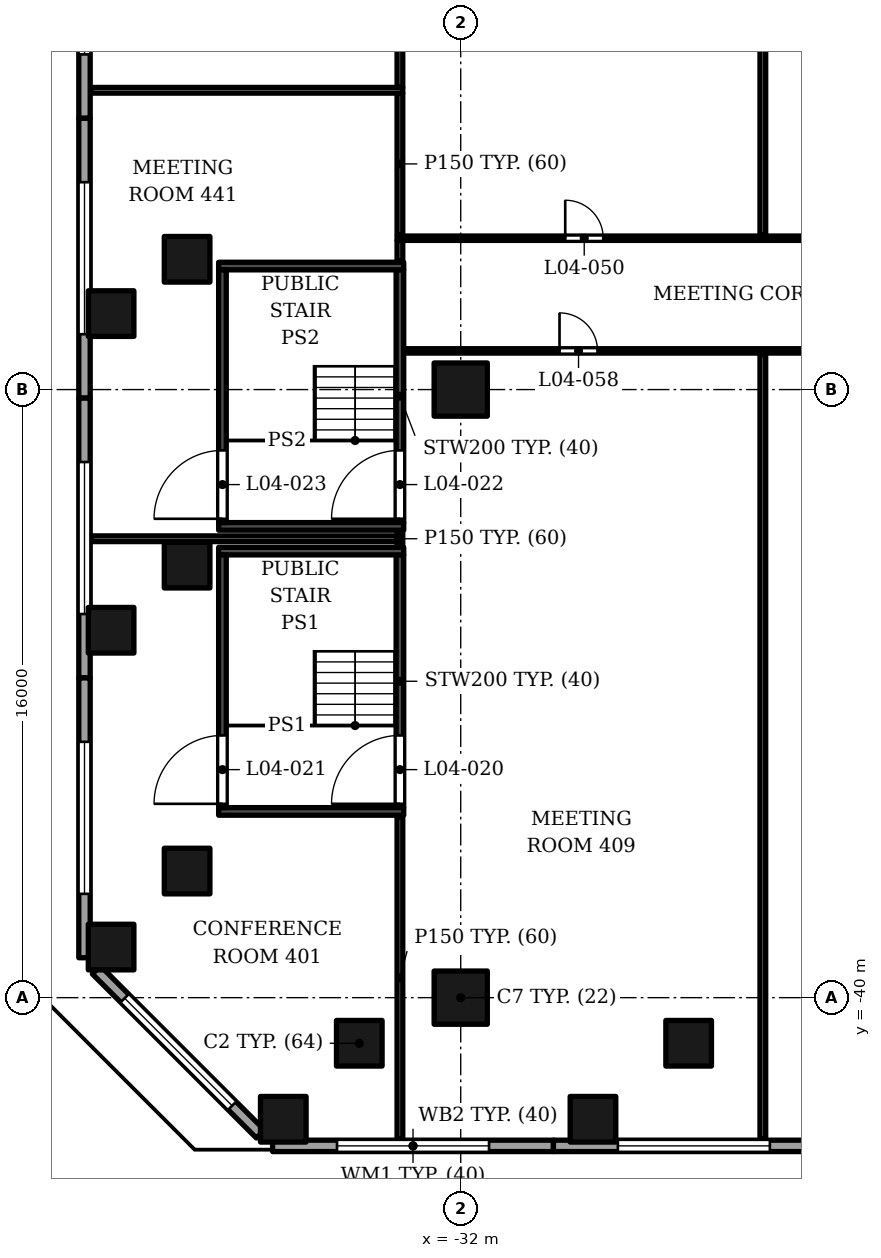
"""IFC4 building model, lengths in metres.
Left out: names, types, materials, properties, quantities, classifications, styles, units other than length and angle.
Written with IfcOpenShell. Run it as: python <this file> out.ifc"""

import sys

from ifc_helpers import new_model, si_unit, direction, frame, frame_2d, origin, origin_2d, place, context, subcontext, project, spatial, rectangle, extrude, element, fill, save


model = new_model("IFC4")
c1 = context("Model", 3, precision=1e-05, world=origin(), true_north=direction((0.0, 1.0)))
c2 = subcontext(c1, "Body", "Model", "MODEL_VIEW")
j1 = project(units=[si_unit("LENGTHUNIT", "METRE"), si_unit("PLANEANGLEUNIT", "RADIAN")], contexts=[c1])
p1 = place(None, origin())
s1 = spatial("IfcSite", under=j1, at=p1, CompositionType="ELEMENT")
p2 = place(p1, origin())
s2 = spatial("IfcBuilding", under=s1, at=p2, CompositionType="ELEMENT")
p3 = place(p2, frame((0.0, 0.0, 34.5)))
s3 = spatial("IfcBuildingStorey", under=s2, at=p3, CompositionType="ELEMENT", Elevation=34.5)
for number, where, z_axis, x_axis in (
    (1, (-32.0, -40.0, 0.0), (0.0, 0.0, 1.0), (1.0, 0.0, 0.0)),
    (2, (-32.0, -24.0, 0.0), (0.0, 0.0, 1.0), (1.0, 0.0, 0.0)),
):
    element("IfcColumn", number, at=place(p3, frame(where, z_axis=z_axis, x_axis=x_axis)), inside=s3, PredefinedType="COLUMN", context=c2, shape_type="SweptSolid", body=[
        extrude(rectangle(XDim=1.4, YDim=1.4, at=origin_2d()), origin(), (0.0, 0.0, 1.0), 5.5),
    ])
for number, where, z_axis, x_axis in (
    (3, (-34.669, -41.2, 0.0), (0.0, 0.0, 1.0), (1.0, 0.0, 0.0)),
    (4, (-39.2, -36.669, 0.0), (0.0, 0.0, 1.0), (1.0, 0.0, 0.0)),
    (5, (-39.2, -28.62, 0.0), (0.0, 0.0, 1.0), (1.0, 0.0, 0.0)),
    (6, (-39.2, -20.572, 0.0), (0.0, 0.0, 1.0), (1.0, 0.0, 0.0)),
    (7, (-26.002, -41.2, 0.0), (0.0, 0.0, 1.0), (1.0, 0.0, 0.0)),
    (8, (-36.669, -43.2, 0.0), (0.0, 0.0, 1.0), (1.0, 0.0, 0.0)),
    (9, (-41.2, -38.669, 0.0), (0.0, 0.0, 1.0), (1.0, 0.0, 0.0)),
    (10, (-41.2, -30.333, 0.0), (0.0, 0.0, 1.0), (1.0, 0.0, 0.0)),
    (11, (-41.2, -22.001, 0.0), (0.0, 0.0, 1.0), (1.0, 0.0, 0.0)),
    (12, (-28.52, -43.2, 0.0), (0.0, 0.0, 1.0), (1.0, 0.0, 0.0)),
):
    element("IfcColumn", number, at=place(p3, frame(where, z_axis=z_axis, x_axis=x_axis)), inside=s3, PredefinedType="COLUMN", context=c2, shape_type="SweptSolid", body=[
        extrude(rectangle(XDim=1.2, YDim=1.2, at=origin_2d()), origin(), (0.0, 0.0, 1.0), 5.5),
    ])
p4 = place(p3, frame((-36.95, -43.9, 0.0), z_axis=(0.0, 0.0, 1.0), x_axis=(1.0, 0.0, 0.0)))
e13 = element("IfcWall", 13, at=p4, inside=s3, PredefinedType="SOLIDWALL", context=c2, shape_type="SweptSolid", body=[
    extrude(rectangle(XDim=7.39, YDim=0.3, at=frame_2d((3.695, 0.0))), origin(), (0.0, 0.0, 1.0), 4.1),
])
p5 = place(p4, frame((1.695, 0.0, 1.0)))
e14 = element("IfcOpeningElement", 14, at=p5, cuts=e13, PredefinedType="OPENING", context=c2, shape_type="SweptSolid", body=[
    extrude(rectangle(XDim=4.0, YDim=1.8, at=frame_2d((2.0, 0.9))), frame((0.0, 0.16, 0.0), z_axis=(0.0, -1.0, 0.0), x_axis=(1.0, 0.0, 0.0)), (0.0, 0.0, 1.0), 0.32),
])
p6 = place(p3, frame((-29.56, -43.9, 0.0), z_axis=(0.0, 0.0, 1.0), x_axis=(1.0, 0.0, 0.0)))
e15 = element("IfcWall", 15, at=p6, inside=s3, PredefinedType="SOLIDWALL", context=c2, shape_type="SweptSolid", body=[
    extrude(rectangle(XDim=7.39, YDim=0.3, at=frame_2d((3.695, 0.0))), origin(), (0.0, 0.0, 1.0), 4.1),
])
p7 = place(p6, frame((1.695, 0.0, 1.0)))
e16 = element("IfcOpeningElement", 16, at=p7, cuts=e15, PredefinedType="OPENING", context=c2, shape_type="SweptSolid", body=[
    extrude(rectangle(XDim=4.0, YDim=1.8, at=frame_2d((2.0, 0.9))), frame((0.0, 0.16, 0.0), z_axis=(0.0, -1.0, 0.0), x_axis=(1.0, 0.0, 0.0)), (0.0, 0.0, 1.0), 0.32),
])
p8 = place(p3, frame((-41.9, -9.5, 0.0), z_axis=(0.0, 0.0, 1.0), x_axis=(0.0, -1.0, 0.0)))
e17 = element("IfcWall", 17, at=p8, inside=s3, PredefinedType="SOLIDWALL", context=c2, shape_type="SweptSolid", body=[
    extrude(rectangle(XDim=7.363, YDim=0.3, at=frame_2d((3.681, 0.0))), origin(), (0.0, 0.0, 1.0), 4.1),
])
p9 = place(p8, frame((1.681, 0.0, 1.0)))
e18 = element("IfcOpeningElement", 18, at=p9, cuts=e17, PredefinedType="OPENING", context=c2, shape_type="SweptSolid", body=[
    extrude(rectangle(XDim=4.0, YDim=1.8, at=frame_2d((2.0, 0.9))), frame((0.0, 0.16, 0.0), z_axis=(0.0, -1.0, 0.0), x_axis=(1.0, 0.0, 0.0)), (0.0, 0.0, 1.0), 0.32),
])
p10 = place(p3, frame((-41.9, -16.863, 0.0), z_axis=(0.0, 0.0, 1.0), x_axis=(0.0, -1.0, 0.0)))
e19 = element("IfcWall", 19, at=p10, inside=s3, PredefinedType="SOLIDWALL", context=c2, shape_type="SweptSolid", body=[
    extrude(rectangle(XDim=7.363, YDim=0.3, at=frame_2d((3.681, 0.0))), origin(), (0.0, 0.0, 1.0), 4.1),
])
p11 = place(p10, frame((1.681, 0.0, 1.0)))
e20 = element("IfcOpeningElement", 20, at=p11, cuts=e19, PredefinedType="OPENING", context=c2, shape_type="SweptSolid", body=[
    extrude(rectangle(XDim=4.0, YDim=1.8, at=frame_2d((2.0, 0.9))), frame((0.0, 0.16, 0.0), z_axis=(0.0, -1.0, 0.0), x_axis=(1.0, 0.0, 0.0)), (0.0, 0.0, 1.0), 0.32),
])
p12 = place(p3, frame((-41.9, -24.225, 0.0), z_axis=(0.0, 0.0, 1.0), x_axis=(0.0, -1.0, 0.0)))
e21 = element("IfcWall", 21, at=p12, inside=s3, PredefinedType="SOLIDWALL", context=c2, shape_type="SweptSolid", body=[
    extrude(rectangle(XDim=7.362, YDim=0.3, at=frame_2d((3.681, 0.0))), origin(), (0.0, 0.0, 1.0), 4.1),
])
p13 = place(p12, frame((1.681, 0.0, 1.0)))
e22 = element("IfcOpeningElement", 22, at=p13, cuts=e21, PredefinedType="OPENING", context=c2, shape_type="SweptSolid", body=[
    extrude(rectangle(XDim=4.0, YDim=1.8, at=frame_2d((2.0, 0.9))), frame((0.0, 0.16, 0.0), z_axis=(0.0, -1.0, 0.0), x_axis=(1.0, 0.0, 0.0)), (0.0, 0.0, 1.0), 0.32),
])
p14 = place(p3, frame((-41.9, -31.587, 0.0), z_axis=(0.0, 0.0, 1.0), x_axis=(0.0, -1.0, 0.0)))
e23 = element("IfcWall", 23, at=p14, inside=s3, PredefinedType="SOLIDWALL", context=c2, shape_type="SweptSolid", body=[
    extrude(rectangle(XDim=7.363, YDim=0.3, at=frame_2d((3.681, 0.0))), origin(), (0.0, 0.0, 1.0), 4.1),
])
p15 = place(p14, frame((1.681, 0.0, 1.0)))
e24 = element("IfcOpeningElement", 24, at=p15, cuts=e23, PredefinedType="OPENING", context=c2, shape_type="SweptSolid", body=[
    extrude(rectangle(XDim=4.0, YDim=1.8, at=frame_2d((2.0, 0.9))), frame((0.0, 0.16, 0.0), z_axis=(0.0, -1.0, 0.0), x_axis=(1.0, 0.0, 0.0)), (0.0, 0.0, 1.0), 0.32),
])
p16 = place(p3, frame((-41.588, -39.271, 0.0), z_axis=(0.0, 0.0, 1.0), x_axis=(0.707106781187, -0.707106781187, 0.0)))
e25 = element("IfcWall", 25, at=p16, inside=s3, PredefinedType="SOLIDWALL", context=c2, shape_type="SweptSolid", body=[
    extrude(rectangle(XDim=6.105, YDim=0.3, at=frame_2d((3.052, 0.0))), origin(), (0.0, 0.0, 1.0), 3.85),
])
p17 = place(p16, frame((1.052, 0.0, 1.0)))
e26 = element("IfcOpeningElement", 26, at=p17, cuts=e25, PredefinedType="OPENING", context=c2, shape_type="SweptSolid", body=[
    extrude(rectangle(XDim=4.0, YDim=1.8, at=frame_2d((2.0, 0.9))), frame((0.0, 0.16, 0.0), z_axis=(0.0, -1.0, 0.0), x_axis=(1.0, 0.0, 0.0)), (0.0, 0.0, 1.0), 0.32),
])
p18 = place(p3, frame((-37.0, -43.85, 5.5), z_axis=(0.0, 0.0, 1.0), x_axis=(1.0, 0.0, 0.0)))
e27 = element("IfcWall", 27, at=p18, inside=s3, PredefinedType="PARAPET", context=c2, shape_type="SweptSolid", body=[
    extrude(rectangle(XDim=14.8, YDim=0.3, at=frame_2d((7.4, 0.0))), origin(), (0.0, 0.0, 1.0), 1.1),
])
for number, where, z_axis, x_axis in (
    (28, (-41.85, -9.605, 5.5), (0.0, 0.0, 1.0), (0.0, -1.0, 0.0)),
    (29, (-41.85, -24.302, 5.5), (0.0, 0.0, 1.0), (0.0, -1.0, 0.0)),
):
    element("IfcWall", number, at=place(p3, frame(where, z_axis=z_axis, x_axis=x_axis)), inside=s3, PredefinedType="PARAPET", context=c2, shape_type="SweptSolid", body=[
        extrude(rectangle(XDim=14.698, YDim=0.3, at=frame_2d((7.349, 0.0))), origin(), (0.0, 0.0, 1.0), 1.1),
    ])
p19 = place(p3, frame((-41.745, -39.042, 5.5), z_axis=(0.0, 0.0, 1.0), x_axis=(0.70708898898, -0.707124572946, 0.0)))
e30 = element("IfcWall", 30, at=p19, inside=s3, PredefinedType="PARAPET", context=c2, shape_type="SweptSolid", body=[
    extrude(rectangle(XDim=6.861, YDim=0.3, at=frame_2d((3.431, 0.0))), origin(), (0.0, 0.0, 1.0), 1.1),
])
for number, where, z_axis, x_axis in (
    (31, (-38.37, -35.1, 0.0), (0.0, 0.0, 1.0), (1.0, 0.0, 0.0)),
    (32, (-38.37, -28.25, 0.0), (0.0, 0.0, 1.0), (1.0, 0.0, 0.0)),
):
    element("IfcWall", number, at=place(p3, frame(where, z_axis=z_axis, x_axis=x_axis)), inside=s3, PredefinedType="SOLIDWALL", context=c2, shape_type="SweptSolid", body=[
        extrude(rectangle(XDim=4.87, YDim=0.2, at=frame_2d((2.435, 0.0))), origin(), (0.0, 0.0, 1.0), 5.05),
    ])
p20 = place(p3, frame((-38.27, -35.0, 0.0), z_axis=(0.0, 0.0, 1.0), x_axis=(0.0, 1.0, 0.0)))
e33 = element("IfcWall", 33, at=p20, inside=s3, PredefinedType="SOLIDWALL", context=c2, shape_type="SweptSolid", body=[
    extrude(rectangle(XDim=6.65, YDim=0.2, at=frame_2d((3.325, 0.0))), origin(), (0.0, 0.0, 1.0), 5.05),
])
p21 = place(p20, frame((0.1, 0.0, 0.0)))
e34 = element("IfcOpeningElement", 34, at=p21, cuts=e33, PredefinedType="OPENING", context=c2, shape_type="SweptSolid", body=[
    extrude(rectangle(XDim=1.8, YDim=2.4, at=frame_2d((0.9, 1.2))), frame((0.0, 0.11, 0.0), z_axis=(0.0, -1.0, 0.0), x_axis=(1.0, 0.0, 0.0)), (0.0, 0.0, 1.0), 0.22),
])
p22 = place(p3, frame((-33.6, -35.0, 0.0), z_axis=(0.0, 0.0, 1.0), x_axis=(0.0, 1.0, 0.0)))
e35 = element("IfcWall", 35, at=p22, inside=s3, PredefinedType="SOLIDWALL", context=c2, shape_type="SweptSolid", body=[
    extrude(rectangle(XDim=6.65, YDim=0.2, at=frame_2d((3.325, 0.0))), origin(), (0.0, 0.0, 1.0), 5.05),
])
p23 = place(p22, frame((0.1, 0.0, 0.0)))
e36 = element("IfcOpeningElement", 36, at=p23, cuts=e35, PredefinedType="OPENING", context=c2, shape_type="SweptSolid", body=[
    extrude(rectangle(XDim=1.8, YDim=2.4, at=frame_2d((0.9, 1.2))), frame((0.0, 0.11, 0.0), z_axis=(0.0, -1.0, 0.0), x_axis=(1.0, 0.0, 0.0)), (0.0, 0.0, 1.0), 0.22),
])
for number, where, z_axis, x_axis in (
    (37, (-38.37, -27.6, 0.0), (0.0, 0.0, 1.0), (1.0, 0.0, 0.0)),
    (38, (-38.37, -20.75, 0.0), (0.0, 0.0, 1.0), (1.0, 0.0, 0.0)),
):
    element("IfcWall", number, at=place(p3, frame(where, z_axis=z_axis, x_axis=x_axis)), inside=s3, PredefinedType="SOLIDWALL", context=c2, shape_type="SweptSolid", body=[
        extrude(rectangle(XDim=4.87, YDim=0.2, at=frame_2d((2.435, 0.0))), origin(), (0.0, 0.0, 1.0), 5.05),
    ])
p24 = place(p3, frame((-38.27, -27.5, 0.0), z_axis=(0.0, 0.0, 1.0), x_axis=(0.0, 1.0, 0.0)))
e39 = element("IfcWall", 39, at=p24, inside=s3, PredefinedType="SOLIDWALL", context=c2, shape_type="SweptSolid", body=[
    extrude(rectangle(XDim=6.65, YDim=0.2, at=frame_2d((3.325, 0.0))), origin(), (0.0, 0.0, 1.0), 5.05),
])
p25 = place(p24, frame((0.1, 0.0, 0.0)))
e40 = element("IfcOpeningElement", 40, at=p25, cuts=e39, PredefinedType="OPENING", context=c2, shape_type="SweptSolid", body=[
    extrude(rectangle(XDim=1.8, YDim=2.4, at=frame_2d((0.9, 1.2))), frame((0.0, 0.11, 0.0), z_axis=(0.0, -1.0, 0.0), x_axis=(1.0, 0.0, 0.0)), (0.0, 0.0, 1.0), 0.22),
])
p26 = place(p3, frame((-33.6, -27.5, 0.0), z_axis=(0.0, 0.0, 1.0), x_axis=(0.0, 1.0, 0.0)))
e41 = element("IfcWall", 41, at=p26, inside=s3, PredefinedType="SOLIDWALL", context=c2, shape_type="SweptSolid", body=[
    extrude(rectangle(XDim=6.65, YDim=0.2, at=frame_2d((3.325, 0.0))), origin(), (0.0, 0.0, 1.0), 5.05),
])
p27 = place(p26, frame((0.1, 0.0, 0.0)))
e42 = element("IfcOpeningElement", 42, at=p27, cuts=e41, PredefinedType="OPENING", context=c2, shape_type="SweptSolid", body=[
    extrude(rectangle(XDim=1.8, YDim=2.4, at=frame_2d((0.9, 1.2))), frame((0.0, 0.11, 0.0), z_axis=(0.0, -1.0, 0.0), x_axis=(1.0, 0.0, 0.0)), (0.0, 0.0, 1.0), 0.22),
])
p28 = place(p3, frame((-33.6, -43.72, 0.0), z_axis=(0.0, 0.0, 1.0), x_axis=(0.0, 1.0, 0.0)))
e43 = element("IfcWall", 43, at=p28, inside=s3, PredefinedType="PARTITIONING", context=c2, shape_type="SweptSolid", body=[
    extrude(rectangle(XDim=8.48, YDim=0.15, at=frame_2d((4.24, 0.0))), origin(), (0.0, 0.0, 1.0), 3.85),
])
p29 = place(p3, frame((-24.05, -43.72, 0.0), z_axis=(0.0, 0.0, 1.0), x_axis=(0.0, 1.0, 0.0)))
e44 = element("IfcWall", 44, at=p29, inside=s3, PredefinedType="PARTITIONING", context=c2, shape_type="SweptSolid", body=[
    extrude(rectangle(XDim=20.645, YDim=0.15, at=frame_2d((10.323, 0.0))), origin(), (0.0, 0.0, 1.0), 3.85),
])
p30 = place(p3, frame((-33.6, -28.11, 0.0), z_axis=(0.0, 0.0, 1.0), x_axis=(0.0, 1.0, 0.0)))
e45 = element("IfcWall", 45, at=p30, inside=s3, PredefinedType="PARTITIONING", context=c2, shape_type="SweptSolid", body=[
    extrude(rectangle(XDim=0.37, YDim=0.15, at=frame_2d((0.185, 0.0))), origin(), (0.0, 0.0, 1.0), 5.05),
])
p31 = place(p3, frame((-41.72, -27.925, 0.0), z_axis=(0.0, 0.0, 1.0), x_axis=(1.0, 0.0, 0.0)))
e46 = element("IfcWall", 46, at=p31, inside=s3, PredefinedType="PARTITIONING", context=c2, shape_type="SweptSolid", body=[
    extrude(rectangle(XDim=8.045, YDim=0.15, at=frame_2d((4.022, 0.0))), origin(), (0.0, 0.0, 1.0), 4.15),
])
p32 = place(p3, frame((-33.46, -22.982, 0.0), z_axis=(0.0, 0.0, 1.0), x_axis=(1.0, 0.0, 0.0)))
e47 = element("IfcWall", 47, at=p32, inside=s3, PredefinedType="PARTITIONING", context=c2, shape_type="SweptSolid", body=[
    extrude(rectangle(XDim=18.69, YDim=0.115, at=frame_2d((9.345, 0.0))), origin(), (0.0, 0.0, 1.0), 3.85),
])
p33 = place(p32, frame((4.06, 0.0, 0.0)))
e48 = element("IfcOpeningElement", 48, at=p33, cuts=e47, PredefinedType="OPENING", context=c2, shape_type="SweptSolid", body=[
    extrude(rectangle(XDim=1.0, YDim=2.1, at=frame_2d((0.5, 1.05))), frame((0.0, 0.067, 0.0), z_axis=(0.0, -1.0, 0.0), x_axis=(1.0, 0.0, 0.0)), (0.0, 0.0, 1.0), 0.135),
])
p34 = place(p3, frame((-33.6, -20.61, 0.0), z_axis=(0.0, 0.0, 1.0), x_axis=(0.0, 1.0, 0.0)))
e49 = element("IfcWall", 49, at=p34, inside=s3, PredefinedType="PARTITIONING", context=c2, shape_type="SweptSolid", body=[
    extrude(rectangle(XDim=0.535, YDim=0.15, at=frame_2d((0.268, 0.0))), origin(), (0.0, 0.0, 1.0), 5.05),
])
p35 = place(p3, frame((-33.675, -20.018, 0.0), z_axis=(0.0, 0.0, 1.0), x_axis=(1.0, 0.0, 0.0)))
e50 = element("IfcWall", 50, at=p35, inside=s3, PredefinedType="PARTITIONING", context=c2, shape_type="SweptSolid", body=[
    extrude(rectangle(XDim=18.905, YDim=0.115, at=frame_2d((9.453, 0.0))), origin(), (0.0, 0.0, 1.0), 3.85),
])
p36 = place(p35, frame((4.425, 0.0, 0.0)))
e51 = element("IfcOpeningElement", 51, at=p36, cuts=e50, PredefinedType="OPENING", context=c2, shape_type="SweptSolid", body=[
    extrude(rectangle(XDim=1.0, YDim=2.1, at=frame_2d((0.5, 1.05))), frame((0.0, 0.067, 0.0), z_axis=(0.0, -1.0, 0.0), x_axis=(1.0, 0.0, 0.0)), (0.0, 0.0, 1.0), 0.135),
])
p37 = place(p3, frame((-33.6, -19.925, 0.0), z_axis=(0.0, 0.0, 1.0), x_axis=(0.0, 1.0, 0.0)))
e52 = element("IfcWall", 52, at=p37, inside=s3, PredefinedType="PARTITIONING", context=c2, shape_type="SweptSolid", body=[
    extrude(rectangle(XDim=3.725, YDim=0.15, at=frame_2d((1.863, 0.0))), origin(), (0.0, 0.0, 1.0), 5.05),
])
p38 = place(p3, frame((-24.05, -19.925, 0.0), z_axis=(0.0, 0.0, 1.0), x_axis=(0.0, 1.0, 0.0)))
e53 = element("IfcWall", 53, at=p38, inside=s3, PredefinedType="PARTITIONING", context=c2, shape_type="SweptSolid", body=[
    extrude(rectangle(XDim=17.85, YDim=0.15, at=frame_2d((8.925, 0.0))), origin(), (0.0, 0.0, 1.0), 3.85),
])
p39 = place(p3, frame((-41.72, -16.125, 0.0), z_axis=(0.0, 0.0, 1.0), x_axis=(1.0, 0.0, 0.0)))
e54 = element("IfcWall", 54, at=p39, inside=s3, PredefinedType="PARTITIONING", context=c2, shape_type="SweptSolid", body=[
    extrude(rectangle(XDim=8.195, YDim=0.15, at=frame_2d((4.098, 0.0))), origin(), (0.0, 0.0, 1.0), 4.15),
])
p40 = place(p3, frame((-33.6, -16.05, 0.0), z_axis=(0.0, 0.0, 1.0), x_axis=(0.0, 1.0, 0.0)))
e55 = element("IfcWall", 55, at=p40, inside=s3, PredefinedType="PARTITIONING", context=c2, shape_type="SweptSolid", body=[
    extrude(rectangle(XDim=4.41, YDim=0.15, at=frame_2d((2.205, 0.0))), origin(), (0.0, 0.0, 1.0), 5.05),
])
p41 = place(p5, origin())
e56 = element("IfcWindow", 56, at=p41, inside=s3, PartitioningType="SINGLE_PANEL", PredefinedType="WINDOW", context=c2, shape_type="SweptSolid", body=[
    extrude(rectangle(XDim=4.0, YDim=1.8, at=frame_2d((2.0, 0.9))), frame((0.0, 0.03, 0.0), z_axis=(0.0, -1.0, 0.0), x_axis=(1.0, 0.0, 0.0)), (0.0, 0.0, 1.0), 0.06),
])
fill(e14, e56)
p42 = place(p7, origin())
e57 = element("IfcWindow", 57, at=p42, inside=s3, PartitioningType="SINGLE_PANEL", PredefinedType="WINDOW", context=c2, shape_type="SweptSolid", body=[
    extrude(rectangle(XDim=4.0, YDim=1.8, at=frame_2d((2.0, 0.9))), frame((0.0, 0.03, 0.0), z_axis=(0.0, -1.0, 0.0), x_axis=(1.0, 0.0, 0.0)), (0.0, 0.0, 1.0), 0.06),
])
fill(e16, e57)
p43 = place(p9, origin())
e58 = element("IfcWindow", 58, at=p43, inside=s3, PartitioningType="SINGLE_PANEL", PredefinedType="WINDOW", context=c2, shape_type="SweptSolid", body=[
    extrude(rectangle(XDim=4.0, YDim=1.8, at=frame_2d((2.0, 0.9))), frame((0.0, 0.03, 0.0), z_axis=(0.0, -1.0, 0.0), x_axis=(1.0, 0.0, 0.0)), (0.0, 0.0, 1.0), 0.06),
])
fill(e18, e58)
p44 = place(p11, origin())
e59 = element("IfcWindow", 59, at=p44, inside=s3, PartitioningType="SINGLE_PANEL", PredefinedType="WINDOW", context=c2, shape_type="SweptSolid", body=[
    extrude(rectangle(XDim=4.0, YDim=1.8, at=frame_2d((2.0, 0.9))), frame((0.0, 0.03, 0.0), z_axis=(0.0, -1.0, 0.0), x_axis=(1.0, 0.0, 0.0)), (0.0, 0.0, 1.0), 0.06),
])
fill(e20, e59)
p45 = place(p13, origin())
e60 = element("IfcWindow", 60, at=p45, inside=s3, PartitioningType="SINGLE_PANEL", PredefinedType="WINDOW", context=c2, shape_type="SweptSolid", body=[
    extrude(rectangle(XDim=4.0, YDim=1.8, at=frame_2d((2.0, 0.9))), frame((0.0, 0.03, 0.0), z_axis=(0.0, -1.0, 0.0), x_axis=(1.0, 0.0, 0.0)), (0.0, 0.0, 1.0), 0.06),
])
fill(e22, e60)
p46 = place(p15, origin())
e61 = element("IfcWindow", 61, at=p46, inside=s3, PartitioningType="SINGLE_PANEL", PredefinedType="WINDOW", context=c2, shape_type="SweptSolid", body=[
    extrude(rectangle(XDim=4.0, YDim=1.8, at=frame_2d((2.0, 0.9))), frame((0.0, 0.03, 0.0), z_axis=(0.0, -1.0, 0.0), x_axis=(1.0, 0.0, 0.0)), (0.0, 0.0, 1.0), 0.06),
])
fill(e24, e61)
p47 = place(p17, origin())
e62 = element("IfcWindow", 62, at=p47, inside=s3, PartitioningType="SINGLE_PANEL", PredefinedType="WINDOW", context=c2, shape_type="SweptSolid", body=[
    extrude(rectangle(XDim=4.0, YDim=1.8, at=frame_2d((2.0, 0.9))), frame((0.0, 0.03, 0.0), z_axis=(0.0, -1.0, 0.0), x_axis=(1.0, 0.0, 0.0)), (0.0, 0.0, 1.0), 0.06),
])
fill(e26, e62)
p48 = place(p23, origin())
e63 = element("IfcDoor", 63, at=p48, inside=s3, OperationType="DOUBLE_DOOR_SINGLE_SWING", PredefinedType="DOOR", context=c2, shape_type="SweptSolid", body=[
    extrude(rectangle(XDim=1.8, YDim=2.4, at=frame_2d((0.9, 1.2))), frame((0.0, 0.025, 0.0), z_axis=(0.0, -1.0, 0.0), x_axis=(1.0, 0.0, 0.0)), (0.0, 0.0, 1.0), 0.05),
])
fill(e36, e63)
p49 = place(p21, origin())
e64 = element("IfcDoor", 64, at=p49, inside=s3, OperationType="DOUBLE_DOOR_SINGLE_SWING", PredefinedType="DOOR", context=c2, shape_type="SweptSolid", body=[
    extrude(rectangle(XDim=1.8, YDim=2.4, at=frame_2d((0.9, 1.2))), frame((0.0, 0.025, 0.0), z_axis=(0.0, -1.0, 0.0), x_axis=(1.0, 0.0, 0.0)), (0.0, 0.0, 1.0), 0.05),
])
fill(e34, e64)
p50 = place(p27, origin())
e65 = element("IfcDoor", 65, at=p50, inside=s3, OperationType="DOUBLE_DOOR_SINGLE_SWING", PredefinedType="DOOR", context=c2, shape_type="SweptSolid", body=[
    extrude(rectangle(XDim=1.8, YDim=2.4, at=frame_2d((0.9, 1.2))), frame((0.0, 0.025, 0.0), z_axis=(0.0, -1.0, 0.0), x_axis=(1.0, 0.0, 0.0)), (0.0, 0.0, 1.0), 0.05),
])
fill(e42, e65)
p51 = place(p25, origin())
e66 = element("IfcDoor", 66, at=p51, inside=s3, OperationType="DOUBLE_DOOR_SINGLE_SWING", PredefinedType="DOOR", context=c2, shape_type="SweptSolid", body=[
    extrude(rectangle(XDim=1.8, YDim=2.4, at=frame_2d((0.9, 1.2))), frame((0.0, 0.025, 0.0), z_axis=(0.0, -1.0, 0.0), x_axis=(1.0, 0.0, 0.0)), (0.0, 0.0, 1.0), 0.05),
])
fill(e40, e66)
p52 = place(p36, origin())
e67 = element("IfcDoor", 67, at=p52, inside=s3, OperationType="SINGLE_SWING_LEFT", PredefinedType="DOOR", context=c2, shape_type="SweptSolid", body=[
    extrude(rectangle(XDim=1.0, YDim=2.1, at=frame_2d((0.5, 1.05))), frame((0.0, 0.025, 0.0), z_axis=(0.0, -1.0, 0.0), x_axis=(1.0, 0.0, 0.0)), (0.0, 0.0, 1.0), 0.05),
])
fill(e51, e67)
p53 = place(p33, origin())
e68 = element("IfcDoor", 68, at=p53, inside=s3, OperationType="SINGLE_SWING_LEFT", PredefinedType="DOOR", context=c2, shape_type="SweptSolid", body=[
    extrude(rectangle(XDim=1.0, YDim=2.1, at=frame_2d((0.5, 1.05))), frame((0.0, 0.025, 0.0), z_axis=(0.0, -1.0, 0.0), x_axis=(1.0, 0.0, 0.0)), (0.0, 0.0, 1.0), 0.05),
])
fill(e48, e68)
save(model, sys.argv[1])
